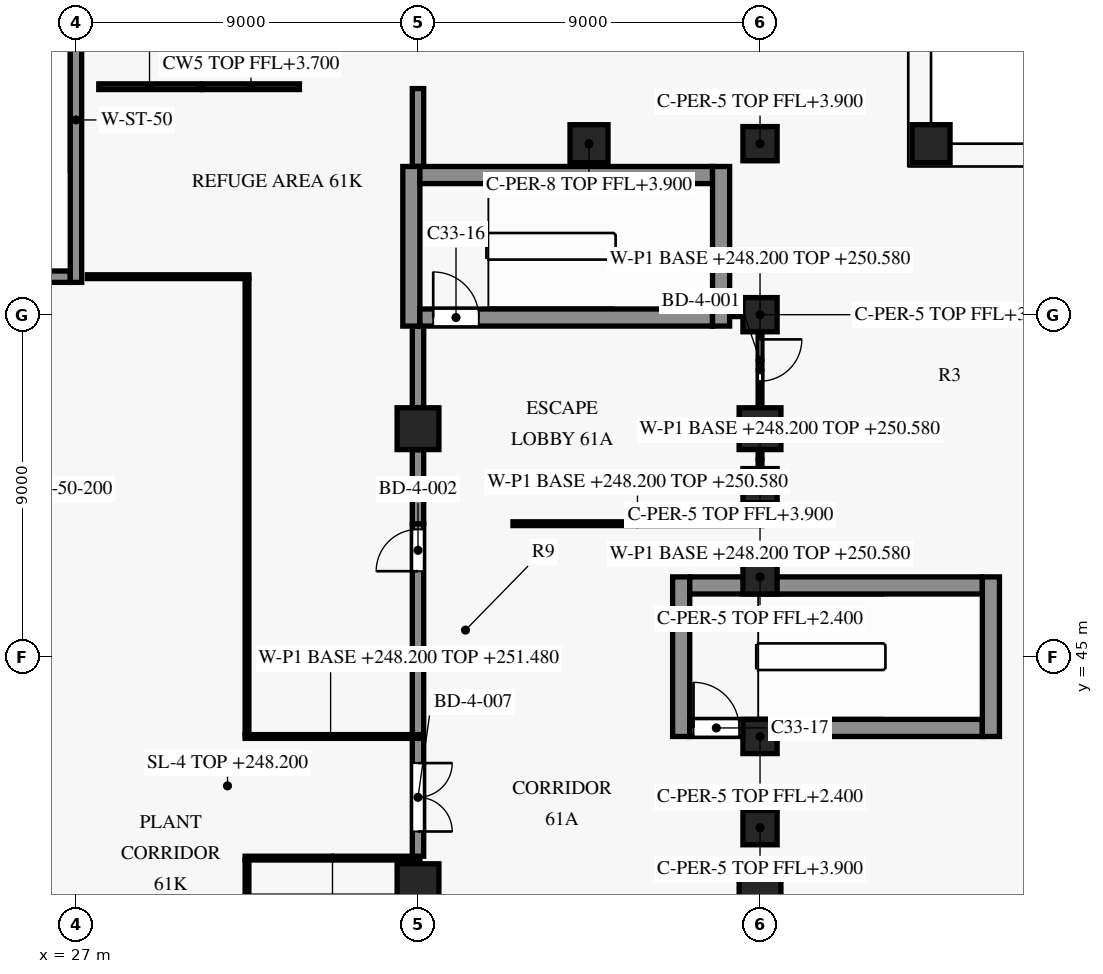
"""IFC4 building model, lengths in metres.
Left out: names, types, materials, properties, quantities, classifications, styles, units other than length and angle.
Written with IfcOpenShell. Run it as: python <this file> out.ifc"""

import sys

from ifc_helpers import new_model, si_unit, direction, frame, frame_2d, origin, origin_2d, place, context, subcontext, project, spatial, rectangle, extrude, element, fill, save


model = new_model("IFC4")
c1 = context("Model", 3, precision=1e-05, world=origin(), true_north=direction((0.0, 1.0)))
c2 = subcontext(c1, "Body", "Model", "MODEL_VIEW")
j1 = project(units=[si_unit("LENGTHUNIT", "METRE"), si_unit("PLANEANGLEUNIT", "RADIAN")], contexts=[c1])
p1 = place(None, origin())
s1 = spatial("IfcSite", under=j1, at=p1, CompositionType="ELEMENT")
p2 = place(p1, origin())
s2 = spatial("IfcBuilding", under=s1, at=p2, CompositionType="ELEMENT")
p3 = place(p2, frame((0.0, 0.0, 248.2)))
s3 = spatial("IfcBuildingStorey", under=s2, at=p3, CompositionType="ELEMENT", Elevation=248.2)
p4 = place(p3, frame((49.5, 58.5, 0.0), z_axis=(0.0, 0.0, 1.0), x_axis=(1.0, 0.0, 0.0)))
e1 = element("IfcColumn", 1, at=p4, inside=s3, PredefinedType="COLUMN", context=c2, shape_type="SweptSolid", body=[
    extrude(rectangle(XDim=1.0, YDim=1.0, at=origin_2d()), origin(), (0.0, 0.0, 1.0), 4.2),
])
for number, where, z_axis, x_axis in (
    (2, (36.0, 39.0, 0.0), (0.0, 0.0, 1.0), (1.0, 0.0, 0.0)),
    (3, (36.0, 51.0, 0.0), (0.0, 0.0, 1.0), (1.0, 0.0, 0.0)),
    (4, (45.0, 39.0, 0.0), (0.0, 0.0, 1.0), (1.0, 0.0, 0.0)),
    (5, (45.0, 51.0, 0.0), (0.0, 0.0, 1.0), (1.0, 0.0, 0.0)),
):
    element("IfcColumn", number, at=place(p3, frame(where, z_axis=z_axis, x_axis=x_axis)), inside=s3, PredefinedType="COLUMN", context=c2, shape_type="SweptSolid", body=[
        extrude(rectangle(XDim=1.1, YDim=1.1, at=origin_2d()), origin(), (0.0, 0.0, 1.0), 4.2),
    ])
p5 = place(p3, frame((43.15, 43.125, 0.0), z_axis=(0.0, 0.0, 1.0), x_axis=(1.0, 0.0, 0.0)))
e6 = element("IfcWall", 6, at=p5, inside=s3, PredefinedType="SHEAR", context=c2, shape_type="SweptSolid", body=[
    extrude(rectangle(XDim=7.7, YDim=0.45, at=frame_2d((3.85, 0.0))), origin(), (0.0, 0.0, 1.0), 3.9),
])
p6 = place(p5, frame((0.1, 0.0, 0.0)))
e7 = element("IfcOpeningElement", 7, at=p6, cuts=e6, PredefinedType="OPENING", context=c2, shape_type="SweptSolid", body=[
    extrude(rectangle(XDim=1.2, YDim=2.2, at=frame_2d((0.6, 1.1))), frame((0.0, 0.235, 0.0), z_axis=(0.0, -1.0, 0.0), x_axis=(1.0, 0.0, 0.0)), (0.0, 0.0, 1.0), 0.47),
])
p7 = place(p3, frame((43.15, 46.875, 0.0), z_axis=(0.0, 0.0, 1.0), x_axis=(1.0, 0.0, 0.0)))
e8 = element("IfcWall", 8, at=p7, inside=s3, PredefinedType="SHEAR", context=c2, shape_type="SweptSolid", body=[
    extrude(rectangle(XDim=7.7, YDim=0.45, at=frame_2d((3.85, 0.0))), origin(), (0.0, 0.0, 1.0), 3.9),
])
p8 = place(p3, frame((36.05, 53.925, 0.0), z_axis=(0.0, 0.0, 1.0), x_axis=(1.0, 0.0, 0.0)))
e9 = element("IfcWall", 9, at=p8, inside=s3, PredefinedType="SHEAR", context=c2, shape_type="SweptSolid", body=[
    extrude(rectangle(XDim=7.7, YDim=0.45, at=frame_2d((3.85, 0.0))), origin(), (0.0, 0.0, 1.0), 3.9),
])
p9 = place(p8, frame((0.35, 0.0, 0.0)))
e10 = element("IfcOpeningElement", 10, at=p9, cuts=e9, PredefinedType="OPENING", context=c2, shape_type="SweptSolid", body=[
    extrude(rectangle(XDim=1.2, YDim=2.2, at=frame_2d((0.6, 1.1))), frame((0.0, 0.235, 0.0), z_axis=(0.0, -1.0, 0.0), x_axis=(1.0, 0.0, 0.0)), (0.0, 0.0, 1.0), 0.47),
])
p10 = place(p3, frame((23.4, 55.0, 0.0), z_axis=(0.0, 0.0, 1.0), x_axis=(1.0, 0.0, 0.0)))
e11 = element("IfcWall", 11, at=p10, inside=s3, PredefinedType="SHEAR", context=c2, shape_type="SweptSolid", body=[
    extrude(rectangle(XDim=3.45, YDim=0.3, at=frame_2d((1.725, 0.0))), origin(), (0.0, 0.0, 1.0), 3.9),
])
p11 = place(p3, frame((36.05, 57.675, 0.0), z_axis=(0.0, 0.0, 1.0), x_axis=(1.0, 0.0, 0.0)))
e12 = element("IfcWall", 12, at=p11, inside=s3, PredefinedType="SHEAR", context=c2, shape_type="SweptSolid", body=[
    extrude(rectangle(XDim=7.7, YDim=0.45, at=frame_2d((3.85, 0.0))), origin(), (0.0, 0.0, 1.0), 3.9),
])
p12 = place(p3, frame((27.0, 54.85, 0.0), z_axis=(0.0, 0.0, 1.0), x_axis=(0.0, 1.0, 0.0)))
e13 = element("IfcWall", 13, at=p12, inside=s3, PredefinedType="SHEAR", context=c2, shape_type="SweptSolid", body=[
    extrude(rectangle(XDim=8.55, YDim=0.3, at=frame_2d((4.275, 0.0))), origin(), (0.0, 0.0, 1.0), 3.9),
])
p13 = place(p12, frame((6.55, 0.0, 0.0)))
e14 = element("IfcOpeningElement", 14, at=p13, cuts=e13, PredefinedType="OPENING", context=c2, shape_type="SweptSolid", body=[
    extrude(rectangle(XDim=1.2, YDim=2.2, at=frame_2d((0.6, 1.1))), frame((0.0, 0.16, 0.0), z_axis=(0.0, -1.0, 0.0), x_axis=(1.0, 0.0, 0.0)), (0.0, 0.0, 1.0), 0.32),
])
p14 = place(p3, frame((35.825, 53.7, 0.0), z_axis=(0.0, 0.0, 1.0), x_axis=(0.0, 1.0, 0.0)))
e15 = element("IfcWall", 15, at=p14, inside=s3, PredefinedType="SHEAR", context=c2, shape_type="SweptSolid", body=[
    extrude(rectangle(XDim=4.2, YDim=0.45, at=frame_2d((2.1, 0.0))), origin(), (0.0, 0.0, 1.0), 3.9),
])
p15 = place(p3, frame((42.925, 42.9, 0.0), z_axis=(0.0, 0.0, 1.0), x_axis=(0.0, 1.0, 0.0)))
e16 = element("IfcWall", 16, at=p15, inside=s3, PredefinedType="SHEAR", context=c2, shape_type="SweptSolid", body=[
    extrude(rectangle(XDim=4.2, YDim=0.45, at=frame_2d((2.1, 0.0))), origin(), (0.0, 0.0, 1.0), 3.9),
])
p16 = place(p3, frame((43.975, 53.7, 0.0), z_axis=(0.0, 0.0, 1.0), x_axis=(0.0, 1.0, 0.0)))
e17 = element("IfcWall", 17, at=p16, inside=s3, PredefinedType="SHEAR", context=c2, shape_type="SweptSolid", body=[
    extrude(rectangle(XDim=4.2, YDim=0.45, at=frame_2d((2.1, 0.0))), origin(), (0.0, 0.0, 1.0), 3.9),
])
p17 = place(p3, frame((51.075, 42.9, 0.0), z_axis=(0.0, 0.0, 1.0), x_axis=(0.0, 1.0, 0.0)))
e18 = element("IfcWall", 18, at=p17, inside=s3, PredefinedType="SHEAR", context=c2, shape_type="SweptSolid", body=[
    extrude(rectangle(XDim=4.2, YDim=0.45, at=frame_2d((2.1, 0.0))), origin(), (0.0, 0.0, 1.0), 3.9),
])
p18 = place(p3, frame((31.5, 39.65, 0.0), z_axis=(0.0, 0.0, 1.0), x_axis=(0.0, -1.0, 0.0)))
e19 = element("IfcWall", 19, at=p18, inside=s3, PredefinedType="PARTITIONING", context=c2, shape_type="SweptSolid", body=[
    extrude(rectangle(XDim=0.95, YDim=0.1, at=frame_2d((0.475, 0.0))), origin(), (0.0, 0.0, 1.0), 3.88),
])
p19 = place(p3, frame((36.05, 39.7, 0.0), z_axis=(0.0, 0.0, 1.0), x_axis=(-1.0, 0.0, 0.0)))
e20 = element("IfcWall", 20, at=p19, inside=s3, PredefinedType="PARTITIONING", context=c2, shape_type="SweptSolid", body=[
    extrude(rectangle(XDim=4.6, YDim=0.1, at=frame_2d((2.3, 0.0))), origin(), (0.0, 0.0, 1.0), 3.28),
])
p20 = place(p3, frame((36.0, 42.85, 0.0), z_axis=(0.0, 0.0, 1.0), x_axis=(0.0, -1.0, 0.0)))
e21 = element("IfcWall", 21, at=p20, inside=s3, PredefinedType="PARTITIONING", context=c2, shape_type="SweptSolid", body=[
    extrude(rectangle(XDim=3.1, YDim=0.3, at=frame_2d((1.55, 0.0))), origin(), (0.0, 0.0, 1.0), 3.28),
])
p21 = place(p20, frame((0.65, 0.0, 0.0)))
e22 = element("IfcOpeningElement", 22, at=p21, cuts=e21, PredefinedType="OPENING", context=c2, shape_type="SweptSolid", body=[
    extrude(rectangle(XDim=1.8, YDim=2.1, at=frame_2d((0.9, 1.05))), frame((0.0, 0.16, 0.0), z_axis=(0.0, -1.0, 0.0), x_axis=(1.0, 0.0, 0.0)), (0.0, 0.0, 1.0), 0.32),
])
p22 = place(p3, frame((31.45, 42.9, 0.0), z_axis=(0.0, 0.0, 1.0), x_axis=(1.0, 0.0, 0.0)))
e23 = element("IfcWall", 23, at=p22, inside=s3, PredefinedType="PARTITIONING", context=c2, shape_type="SweptSolid", body=[
    extrude(rectangle(XDim=4.5, YDim=0.1, at=frame_2d((2.25, 0.0))), origin(), (0.0, 0.0, 1.0), 3.28),
])
p23 = place(p3, frame((36.0, 42.95, 0.0), z_axis=(0.0, 0.0, 1.0), x_axis=(0.0, 1.0, 0.0)))
e24 = element("IfcWall", 24, at=p23, inside=s3, PredefinedType="PARTITIONING", context=c2, shape_type="SweptSolid", body=[
    extrude(rectangle(XDim=5.55, YDim=0.3, at=frame_2d((2.775, 0.0))), origin(), (0.0, 0.0, 1.0), 3.28),
])
p24 = place(p23, frame((4.3, 0.0, 0.0)))
e25 = element("IfcOpeningElement", 25, at=p24, cuts=e24, PredefinedType="OPENING", context=c2, shape_type="SweptSolid", body=[
    extrude(rectangle(XDim=1.1, YDim=2.1, at=frame_2d((0.55, 1.05))), frame((0.0, 0.16, 0.0), z_axis=(0.0, -1.0, 0.0), x_axis=(1.0, 0.0, 0.0)), (0.0, 0.0, 1.0), 0.32),
])
p25 = place(p3, frame((36.0, 48.5, 0.0), z_axis=(0.0, 0.0, 1.0), x_axis=(0.0, 1.0, 0.0)))
e26 = element("IfcWall", 26, at=p25, inside=s3, PredefinedType="PARTITIONING", context=c2, shape_type="SweptSolid", body=[
    extrude(rectangle(XDim=1.945, YDim=0.3, at=frame_2d((0.973, 0.0))), origin(), (0.0, 0.0, 1.0), 3.28),
])
p26 = place(p3, frame((45.05, 48.5, 0.0), z_axis=(0.0, 0.0, 1.0), x_axis=(-1.0, 0.0, 0.0)))
e27 = element("IfcWall", 27, at=p26, inside=s3, PredefinedType="PARTITIONING", context=c2, shape_type="SweptSolid", body=[
    extrude(rectangle(XDim=6.55, YDim=0.1, at=frame_2d((3.275, 0.0))), origin(), (0.0, 0.0, 1.0), 2.38),
])
p27 = place(p3, frame((45.0, 49.045, 0.0), z_axis=(0.0, 0.0, 1.0), x_axis=(0.0, -1.0, 0.0)))
e28 = element("IfcWall", 28, at=p27, inside=s3, PredefinedType="PARTITIONING", context=c2, shape_type="SweptSolid", body=[
    extrude(rectangle(XDim=0.495, YDim=0.1, at=frame_2d((0.248, 0.0))), origin(), (0.0, 0.0, 1.0), 2.38),
])
p28 = place(p3, frame((45.0, 50.445, 0.0), z_axis=(0.0, 0.0, 1.0), x_axis=(0.0, -1.0, 0.0)))
e29 = element("IfcWall", 29, at=p28, inside=s3, PredefinedType="PARTITIONING", context=c2, shape_type="SweptSolid", body=[
    extrude(rectangle(XDim=0.49, YDim=0.1, at=frame_2d((0.245, 0.0))), origin(), (0.0, 0.0, 1.0), 2.38),
])
p29 = place(p3, frame((36.0, 51.555, 0.0), z_axis=(0.0, 0.0, 1.0), x_axis=(0.0, 1.0, 0.0)))
e30 = element("IfcWall", 30, at=p29, inside=s3, PredefinedType="PARTITIONING", context=c2, shape_type="SweptSolid", body=[
    extrude(rectangle(XDim=2.145, YDim=0.3, at=frame_2d((1.073, 0.0))), origin(), (0.0, 0.0, 1.0), 3.28),
])
p30 = place(p3, frame((45.0, 53.545, 0.0), z_axis=(0.0, 0.0, 1.0), x_axis=(0.0, -1.0, 0.0)))
e31 = element("IfcWall", 31, at=p30, inside=s3, PredefinedType="PARTITIONING", context=c2, shape_type="SweptSolid", body=[
    extrude(rectangle(XDim=1.99, YDim=0.1, at=frame_2d((0.995, 0.0))), origin(), (0.0, 0.0, 1.0), 2.38),
])
p31 = place(p30, frame((0.195, 0.0, 0.0)))
e32 = element("IfcOpeningElement", 32, at=p31, cuts=e31, PredefinedType="OPENING", context=c2, shape_type="SweptSolid", body=[
    extrude(rectangle(XDim=1.1, YDim=2.1, at=frame_2d((0.55, 1.05))), frame((0.0, 0.06, 0.0), z_axis=(0.0, -1.0, 0.0), x_axis=(1.0, 0.0, 0.0)), (0.0, 0.0, 1.0), 0.12),
])
p32 = place(p3, frame((44.2, 54.0, 0.0), z_axis=(0.0, 0.0, 1.0), x_axis=(1.0, 0.0, 0.0)))
e33 = element("IfcWall", 33, at=p32, inside=s3, PredefinedType="PARTITIONING", context=c2, shape_type="SweptSolid", body=[
    extrude(rectangle(XDim=0.345, YDim=0.1, at=frame_2d((0.172, 0.0))), origin(), (0.0, 0.0, 1.0), 3.88),
])
p33 = place(p3, frame((31.5, 54.95, 0.0), z_axis=(0.0, 0.0, 1.0), x_axis=(0.0, -1.0, 0.0)))
e34 = element("IfcWall", 34, at=p33, inside=s3, PredefinedType="PARTITIONING", context=c2, shape_type="SweptSolid", body=[
    extrude(rectangle(XDim=12.0, YDim=0.1, at=frame_2d((6.0, 0.0))), origin(), (0.0, 0.0, 1.0), 3.88),
])
p34 = place(p3, frame((27.3, 55.0, 0.0), z_axis=(0.0, 0.0, 1.0), x_axis=(1.0, 0.0, 0.0)))
e35 = element("IfcWall", 35, at=p34, inside=s3, PredefinedType="PARTITIONING", context=c2, shape_type="SweptSolid", body=[
    extrude(rectangle(XDim=4.25, YDim=0.1, at=frame_2d((2.125, 0.0))), origin(), (0.0, 0.0, 1.0), 3.88),
])
p35 = place(p3, frame((36.0, 59.95, 0.0), z_axis=(0.0, 0.0, 1.0), x_axis=(0.0, -1.0, 0.0)))
e36 = element("IfcWall", 36, at=p35, inside=s3, PredefinedType="PARTITIONING", context=c2, shape_type="SweptSolid", body=[
    extrude(rectangle(XDim=2.05, YDim=0.3, at=frame_2d((1.025, 0.0))), origin(), (0.0, 0.0, 1.0), 3.28),
])
p36 = place(p3, frame((40.5, 58.5, 0.0), z_axis=(0.0, 0.0, 1.0), x_axis=(1.0, 0.0, 0.0)))
e37 = element("IfcColumn", 37, at=p36, inside=s3, PredefinedType="COLUMN", context=c2, shape_type="SweptSolid", body=[
    extrude(rectangle(XDim=1.0, YDim=1.0, at=origin_2d()), origin(), (0.0, 0.0, 1.0), 3.9),
])
p37 = place(p3, frame((45.0, 40.5, 0.0), z_axis=(0.0, 0.0, 1.0), x_axis=(0.0, 1.0, 0.0)))
e38 = element("IfcColumn", 38, at=p37, inside=s3, PredefinedType="COLUMN", context=c2, shape_type="SweptSolid", body=[
    extrude(rectangle(XDim=0.9, YDim=0.9, at=origin_2d()), origin(), (0.0, 0.0, 1.0), 3.9),
])
for number, where, z_axis, x_axis in (
    (39, (45.0, 42.9, 0.0), (0.0, 0.0, 1.0), (1.0, 0.0, 0.0)),
    (40, (45.0, 47.1, 0.0), (0.0, 0.0, 1.0), (1.0, 0.0, 0.0)),
):
    element("IfcColumn", number, at=place(p3, frame(where, z_axis=z_axis, x_axis=x_axis)), inside=s3, PredefinedType="COLUMN", context=c2, shape_type="SweptSolid", body=[
        extrude(rectangle(XDim=0.9, YDim=0.9, at=origin_2d()), origin(), (0.0, 0.0, 1.0), 2.4),
    ])
for number, where, z_axis, x_axis in (
    (41, (45.0, 49.5, 0.0), (0.0, 0.0, 1.0), (0.0, 1.0, 0.0)),
    (42, (45.0, 54.0, 0.0), (0.0, 0.0, 1.0), (0.0, 1.0, 0.0)),
    (43, (45.0, 58.5, 0.0), (0.0, 0.0, 1.0), (0.0, 1.0, 0.0)),
):
    element("IfcColumn", number, at=place(p3, frame(where, z_axis=z_axis, x_axis=x_axis)), inside=s3, PredefinedType="COLUMN", context=c2, shape_type="SweptSolid", body=[
        extrude(rectangle(XDim=0.9, YDim=0.9, at=origin_2d()), origin(), (0.0, 0.0, 1.0), 3.9),
    ])
p38 = place(p9, origin())
e44 = element("IfcDoor", 44, at=p38, inside=s3, OperationType="SINGLE_SWING_LEFT", PredefinedType="DOOR", context=c2, shape_type="SweptSolid", body=[
    extrude(rectangle(XDim=1.2, YDim=2.2, at=frame_2d((0.6, 1.1))), frame((0.0, 0.025, 0.0), z_axis=(0.0, -1.0, 0.0), x_axis=(1.0, 0.0, 0.0)), (0.0, 0.0, 1.0), 0.05),
])
fill(e10, e44)
p39 = place(p6, origin())
e45 = element("IfcDoor", 45, at=p39, inside=s3, OperationType="SINGLE_SWING_RIGHT", PredefinedType="DOOR", context=c2, shape_type="SweptSolid", body=[
    extrude(rectangle(XDim=1.2, YDim=2.2, at=frame_2d((0.6, 1.1))), frame((0.0, 0.025, 0.0), z_axis=(0.0, -1.0, 0.0), x_axis=(1.0, 0.0, 0.0)), (0.0, 0.0, 1.0), 0.05),
])
fill(e7, e45)
p40 = place(p31, origin())
e46 = element("IfcDoor", 46, at=p40, inside=s3, OperationType="SINGLE_SWING_LEFT", PredefinedType="DOOR", context=c2, shape_type="SweptSolid", body=[
    extrude(rectangle(XDim=1.1, YDim=2.1, at=frame_2d((0.55, 1.05))), frame((0.0, 0.025, 0.0), z_axis=(0.0, -1.0, 0.0), x_axis=(1.0, 0.0, 0.0)), (0.0, 0.0, 1.0), 0.05),
])
fill(e32, e46)
p41 = place(p24, origin())
e47 = element("IfcDoor", 47, at=p41, inside=s3, OperationType="SINGLE_SWING_RIGHT", PredefinedType="DOOR", context=c2, shape_type="SweptSolid", body=[
    extrude(rectangle(XDim=1.1, YDim=2.1, at=frame_2d((0.55, 1.05))), frame((0.0, 0.025, 0.0), z_axis=(0.0, -1.0, 0.0), x_axis=(1.0, 0.0, 0.0)), (0.0, 0.0, 1.0), 0.05),
])
fill(e25, e47)
p42 = place(p21, origin())
e48 = element("IfcDoor", 48, at=p42, inside=s3, OperationType="DOUBLE_DOOR_SINGLE_SWING", PredefinedType="DOOR", context=c2, shape_type="SweptSolid", body=[
    extrude(rectangle(XDim=1.8, YDim=2.1, at=frame_2d((0.9, 1.05))), frame((0.0, 0.025, 0.0), z_axis=(0.0, -1.0, 0.0), x_axis=(1.0, 0.0, 0.0)), (0.0, 0.0, 1.0), 0.05),
])
fill(e22, e48)
save(model, sys.argv[1])
